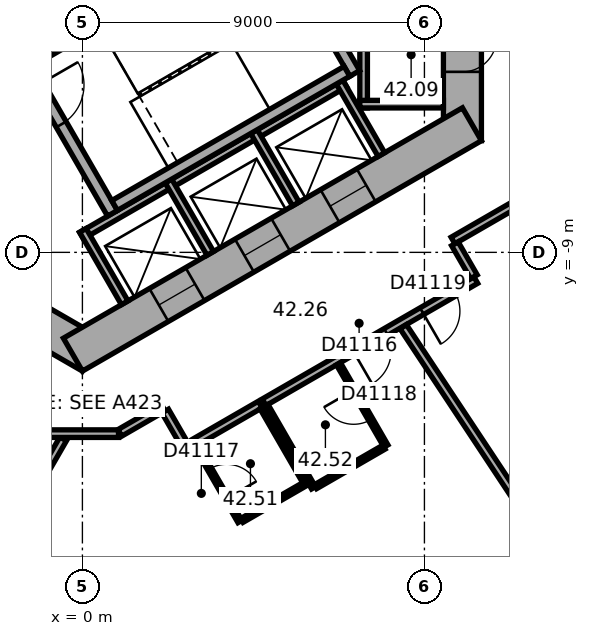
"""IFC4 building model, lengths in metres.
Left out: names, types, materials, properties, quantities, classifications, styles, units other than length and angle.
Written with IfcOpenShell. Run it as: python <this file> out.ifc"""

import sys

from ifc_helpers import new_model, si_unit, direction, frame, frame_2d, origin, place, context, subcontext, project, spatial, rectangle, extrude, element, fill, save


model = new_model("IFC4")
c1 = context("Model", 3, precision=1e-05, world=origin(), true_north=direction((0.0, 1.0)))
c2 = subcontext(c1, "Body", "Model", "MODEL_VIEW")
j1 = project(units=[si_unit("LENGTHUNIT", "METRE"), si_unit("PLANEANGLEUNIT", "RADIAN")], contexts=[c1])
p1 = place(None, origin())
s1 = spatial("IfcSite", under=j1, at=p1, CompositionType="ELEMENT")
p2 = place(p1, origin())
s2 = spatial("IfcBuilding", under=s1, at=p2, CompositionType="ELEMENT")
p3 = place(p2, frame((0.0, 0.0, 172.5)))
s3 = spatial("IfcBuildingStorey", under=s2, at=p3, CompositionType="ELEMENT", Elevation=172.5)
p4 = place(p3, frame((10.0, -6.062, 0.0), z_axis=(0.0, 0.0, 1.0), x_axis=(0.0, 1.0, 0.0)))
e1 = element("IfcWall", 1, at=p4, inside=s3, PredefinedType="SHEAR", context=c2, shape_type="SweptSolid", body=[
    extrude(rectangle(XDim=12.125, YDim=1.0, at=frame_2d((6.062, 0.0))), origin(), (0.0, 0.0, 1.0), 3.7),
])
p5 = place(p4, frame((6.262, 0.0, 0.0)))
e2 = element("IfcOpeningElement", 2, at=p5, cuts=e1, PredefinedType="OPENING", context=c2, shape_type="SweptSolid", body=[
    extrude(rectangle(XDim=1.5, YDim=2.1, at=frame_2d((0.75, 1.05))), frame((0.0, 0.51, 0.0), z_axis=(0.0, -1.0, 0.0), x_axis=(1.0, 0.0, 0.0)), (0.0, 0.0, 1.0), 1.02),
])
p6 = place(p4, frame((1.812, 0.0, 0.0)))
e3 = element("IfcOpeningElement", 3, at=p6, cuts=e1, PredefinedType="OPENING", context=c2, shape_type="SweptSolid", body=[
    extrude(rectangle(XDim=0.9, YDim=2.1, at=frame_2d((0.45, 1.05))), frame((0.0, 0.51, 0.0), z_axis=(0.0, -1.0, 0.0), x_axis=(1.0, 0.0, 0.0)), (0.0, 0.0, 1.0), 1.02),
])
p7 = place(p4, frame((4.412, 0.0, 0.0)))
e4 = element("IfcOpeningElement", 4, at=p7, cuts=e1, PredefinedType="OPENING", context=c2, shape_type="SweptSolid", body=[
    extrude(rectangle(XDim=0.9, YDim=2.1, at=frame_2d((0.45, 1.05))), frame((0.0, 0.51, 0.0), z_axis=(0.0, -1.0, 0.0), x_axis=(1.0, 0.0, 0.0)), (0.0, 0.0, 1.0), 1.02),
])
p8 = place(p3, frame((-10.25, -5.629, 0.0), z_axis=(0.0, 0.0, 1.0), x_axis=(0.866022616891, -0.50000482701, 0.0)))
e5 = element("IfcWall", 5, at=p8, inside=s3, PredefinedType="SHEAR", context=c2, shape_type="SweptSolid", body=[
    extrude(rectangle(XDim=12.125, YDim=1.0, at=frame_2d((6.062, 0.0))), origin(), (0.0, 0.0, 1.0), 3.7),
])
p9 = place(p8, frame((6.262, 0.0, 0.0)))
e6 = element("IfcOpeningElement", 6, at=p9, cuts=e5, PredefinedType="OPENING", context=c2, shape_type="SweptSolid", body=[
    extrude(rectangle(XDim=1.5, YDim=2.1, at=frame_2d((0.75, 1.05))), frame((0.0, 0.51, 0.0), z_axis=(0.0, -1.0, 0.0), x_axis=(1.0, 0.0, 0.0)), (0.0, 0.0, 1.0), 1.02),
])
p10 = place(p8, frame((1.712, 0.0, 0.0)))
e7 = element("IfcOpeningElement", 7, at=p10, cuts=e5, PredefinedType="OPENING", context=c2, shape_type="SweptSolid", body=[
    extrude(rectangle(XDim=1.1, YDim=2.1, at=frame_2d((0.55, 1.05))), frame((0.0, 0.51, 0.0), z_axis=(0.0, -1.0, 0.0), x_axis=(1.0, 0.0, 0.0)), (0.0, 0.0, 1.0), 1.02),
])
p11 = place(p8, frame((4.312, 0.0, 0.0)))
e8 = element("IfcOpeningElement", 8, at=p11, cuts=e5, PredefinedType="OPENING", context=c2, shape_type="SweptSolid", body=[
    extrude(rectangle(XDim=1.1, YDim=2.1, at=frame_2d((0.55, 1.05))), frame((0.0, 0.51, 0.0), z_axis=(0.0, -1.0, 0.0), x_axis=(1.0, 0.0, 0.0)), (0.0, 0.0, 1.0), 1.02),
])
p12 = place(p3, frame((-0.25, -11.691, 0.0), z_axis=(0.0, 0.0, 1.0), x_axis=(0.866022616891, 0.50000482701, 0.0)))
e9 = element("IfcWall", 9, at=p12, inside=s3, PredefinedType="SHEAR", context=c2, shape_type="SweptSolid", body=[
    extrude(rectangle(XDim=12.125, YDim=1.0, at=frame_2d((6.062, 0.0))), origin(), (0.0, 0.0, 1.0), 3.7),
])
p13 = place(p12, frame((2.612, 0.0, 0.0)))
e10 = element("IfcOpeningElement", 10, at=p13, cuts=e9, PredefinedType="OPENING", context=c2, shape_type="SweptSolid", body=[
    extrude(rectangle(XDim=1.1, YDim=2.1, at=frame_2d((0.55, 1.05))), frame((0.0, 0.51, 0.0), z_axis=(0.0, -1.0, 0.0), x_axis=(1.0, 0.0, 0.0)), (0.0, 0.0, 1.0), 1.02),
])
p14 = place(p12, frame((5.212, 0.0, 0.0)))
e11 = element("IfcOpeningElement", 11, at=p14, cuts=e9, PredefinedType="OPENING", context=c2, shape_type="SweptSolid", body=[
    extrude(rectangle(XDim=1.1, YDim=2.1, at=frame_2d((0.55, 1.05))), frame((0.0, 0.51, 0.0), z_axis=(0.0, -1.0, 0.0), x_axis=(1.0, 0.0, 0.0)), (0.0, 0.0, 1.0), 1.02),
])
p15 = place(p12, frame((7.812, 0.0, 0.0)))
e12 = element("IfcOpeningElement", 12, at=p15, cuts=e9, PredefinedType="OPENING", context=c2, shape_type="SweptSolid", body=[
    extrude(rectangle(XDim=1.1, YDim=2.1, at=frame_2d((0.55, 1.05))), frame((0.0, 0.51, 0.0), z_axis=(0.0, -1.0, 0.0), x_axis=(1.0, 0.0, 0.0)), (0.0, 0.0, 1.0), 1.02),
])
p16 = place(p3, frame((2.911, -24.156, 0.0), z_axis=(0.0, 0.0, 1.0), x_axis=(0.833882163564, 0.551942512668, 0.0)))
e13 = element("IfcWall", 13, at=p16, inside=s3, PredefinedType="STANDARD", context=c2, shape_type="SweptSolid", body=[
    extrude(rectangle(XDim=20.044, YDim=0.2, at=frame_2d((10.022, 0.0))), origin(), (0.0, 0.0, 1.0), 3.7),
])
p17 = place(p16, frame((1.313, 0.0, 0.9)))
e14 = element("IfcOpeningElement", 14, at=p17, cuts=e13, PredefinedType="OPENING", context=c2, shape_type="SweptSolid", body=[
    extrude(rectangle(XDim=2.4, YDim=2.0, at=frame_2d((1.2, 1.0))), frame((0.0, 0.11, 0.0), z_axis=(0.0, -1.0, 0.0), x_axis=(1.0, 0.0, 0.0)), (0.0, 0.0, 1.0), 0.22),
])
p18 = place(p16, frame((5.067, 0.0, 0.9)))
e15 = element("IfcOpeningElement", 15, at=p18, cuts=e13, PredefinedType="OPENING", context=c2, shape_type="SweptSolid", body=[
    extrude(rectangle(XDim=2.4, YDim=2.0, at=frame_2d((1.2, 1.0))), frame((0.0, 0.11, 0.0), z_axis=(0.0, -1.0, 0.0), x_axis=(1.0, 0.0, 0.0)), (0.0, 0.0, 1.0), 0.22),
])
p19 = place(p16, frame((8.821, 0.0, 0.9)))
e16 = element("IfcOpeningElement", 16, at=p19, cuts=e13, PredefinedType="OPENING", context=c2, shape_type="SweptSolid", body=[
    extrude(rectangle(XDim=2.4, YDim=2.0, at=frame_2d((1.2, 1.0))), frame((0.0, 0.11, 0.0), z_axis=(0.0, -1.0, 0.0), x_axis=(1.0, 0.0, 0.0)), (0.0, 0.0, 1.0), 0.22),
])
p20 = place(p16, frame((12.575, 0.0, 0.9)))
e17 = element("IfcOpeningElement", 17, at=p20, cuts=e13, PredefinedType="OPENING", context=c2, shape_type="SweptSolid", body=[
    extrude(rectangle(XDim=2.4, YDim=2.0, at=frame_2d((1.2, 1.0))), frame((0.0, 0.11, 0.0), z_axis=(0.0, -1.0, 0.0), x_axis=(1.0, 0.0, 0.0)), (0.0, 0.0, 1.0), 0.22),
])
p21 = place(p16, frame((16.329, 0.0, 0.9)))
e18 = element("IfcOpeningElement", 18, at=p21, cuts=e13, PredefinedType="OPENING", context=c2, shape_type="SweptSolid", body=[
    extrude(rectangle(XDim=2.4, YDim=2.0, at=frame_2d((1.2, 1.0))), frame((0.0, 0.11, 0.0), z_axis=(0.0, -1.0, 0.0), x_axis=(1.0, 0.0, 0.0)), (0.0, 0.0, 1.0), 0.22),
])
p22 = place(p3, frame((7.4, -5.2, 0.0), z_axis=(0.0, 0.0, 1.0), x_axis=(0.0, 1.0, 0.0)))
e19 = element("IfcWall", 19, at=p22, inside=s3, PredefinedType="PARTITIONING", context=c2, shape_type="SweptSolid", body=[
    extrude(rectangle(XDim=5.4, YDim=0.2, at=frame_2d((2.7, 0.0))), origin(), (0.0, 0.0, 1.0), 3.42),
])
p23 = place(p3, frame((7.3, -5.1, 0.0), z_axis=(0.0, 0.0, 1.0), x_axis=(1.0, 0.0, 0.0)))
e20 = element("IfcWall", 20, at=p23, inside=s3, PredefinedType="PARTITIONING", context=c2, shape_type="SweptSolid", body=[
    extrude(rectangle(XDim=2.2, YDim=0.2, at=frame_2d((1.1, 0.0))), origin(), (0.0, 0.0, 1.0), 3.42),
])
p24 = place(p3, frame((-0.024, -8.559, 0.0), z_axis=(0.0, 0.0, 1.0), x_axis=(0.866026010844, 0.49999894854, 0.0)))
e21 = element("IfcWall", 21, at=p24, inside=s3, PredefinedType="PARTITIONING", context=c2, shape_type="SweptSolid", body=[
    extrude(rectangle(XDim=8.0, YDim=0.2, at=frame_2d((4.0, 0.0))), origin(), (0.0, 0.0, 1.0), 3.42),
])
for number, where, z_axis, x_axis in (
    (22, (0.013, -8.422, 0.0), (0.0, 0.0, 1.0), (0.5, -0.866, 0.0)),
    (23, (2.264, -7.122, 0.0), (0.0, 0.0, 1.0), (0.5, -0.866, 0.0)),
    (24, (4.516, -5.822, 0.0), (0.0, 0.0, 1.0), (0.5, -0.866, 0.0)),
    (25, (6.768, -4.522, 0.0), (0.0, 0.0, 1.0), (0.5, -0.866, 0.0)),
):
    element("IfcWall", number, at=place(p3, frame(where, z_axis=z_axis, x_axis=x_axis)), inside=s3, PredefinedType="PARTITIONING", context=c2, shape_type="SweptSolid", body=[
        extrude(rectangle(XDim=2.2, YDim=0.2, at=frame_2d((1.1, 0.0))), origin(), (0.0, 0.0, 1.0), 3.42),
    ])
p25 = place(p3, frame((-1.558, -3.902, 0.0), z_axis=(0.0, 0.0, 1.0), x_axis=(0.499977259774, -0.866038532462, 0.0)))
e26 = element("IfcWall", 26, at=p25, inside=s3, PredefinedType="SHEAR", context=c2, shape_type="SweptSolid", body=[
    extrude(rectangle(XDim=4.7, YDim=0.3, at=frame_2d((2.35, 0.0))), origin(), (0.0, 0.0, 1.0), 3.42),
])
p26 = place(p25, frame((0.8, 0.0, 0.0)))
e27 = element("IfcOpeningElement", 27, at=p26, cuts=e26, PredefinedType="OPENING", context=c2, shape_type="SweptSolid", body=[
    extrude(rectangle(XDim=1.2, YDim=2.1, at=frame_2d((0.6, 1.05))), frame((0.0, 0.16, 0.0), z_axis=(0.0, -1.0, 0.0), x_axis=(1.0, 0.0, 0.0)), (0.0, 0.0, 1.0), 0.32),
])
p27 = place(p3, frame((4.816, -0.222, 0.0), z_axis=(0.0, 0.0, 1.0), x_axis=(0.499977259774, -0.866038532462, 0.0)))
e28 = element("IfcWall", 28, at=p27, inside=s3, PredefinedType="SHEAR", context=c2, shape_type="SweptSolid", body=[
    extrude(rectangle(XDim=4.7, YDim=0.3, at=frame_2d((2.35, 0.0))), origin(), (0.0, 0.0, 1.0), 3.42),
])
for number, where, z_axis, x_axis in (
    (29, (-1.353, -3.957, 0.0), (0.0, 0.0, 1.0), (0.866, 0.5, 0.0)),
    (30, (0.847, -7.767, 0.0), (0.0, 0.0, 1.0), (0.866, 0.5, 0.0)),
):
    element("IfcWall", number, at=place(p3, frame(where, z_axis=z_axis, x_axis=x_axis)), inside=s3, PredefinedType="SHEAR", context=c2, shape_type="SweptSolid", body=[
        extrude(rectangle(XDim=7.06, YDim=0.3, at=frame_2d((3.53, 0.0))), origin(), (0.0, 0.0, 1.0), 3.42),
    ])
p28 = place(p3, frame((-4.732, -21.228, 0.0), z_axis=(0.0, 0.0, 1.0), x_axis=(0.500000843414, 0.866024916838, 0.0)))
e31 = element("IfcWall", 31, at=p28, inside=s3, PredefinedType="PARTITIONING", context=c2, shape_type="SweptSolid", body=[
    extrude(rectangle(XDim=8.452, YDim=0.2, at=frame_2d((4.226, 0.0))), origin(), (0.0, 0.0, 1.0), 3.42),
])
p29 = place(p3, frame((-0.91, -13.77, 0.0), z_axis=(0.0, 0.0, 1.0), x_axis=(1.0, 0.0, 0.0)))
e32 = element("IfcWall", 32, at=p29, inside=s3, PredefinedType="PARTITIONING", context=c2, shape_type="SweptSolid", body=[
    extrude(rectangle(XDim=1.86, YDim=0.2, at=frame_2d((0.93, 0.0))), origin(), (0.0, 0.0, 1.0), 3.42),
])
p30 = place(p3, frame((0.985, -13.75, 0.0), z_axis=(0.0, 0.0, 1.0), x_axis=(0.866028661061, 0.499994358189, 0.0)))
e33 = element("IfcWall", 33, at=p30, inside=s3, PredefinedType="PARTITIONING", context=c2, shape_type="SweptSolid", body=[
    extrude(rectangle(XDim=1.321, YDim=0.2, at=frame_2d((0.661, 0.0))), origin(), (0.0, 0.0, 1.0), 3.42),
])
p31 = place(p3, frame((2.179, -13.176, 0.0), z_axis=(0.0, 0.0, 1.0), x_axis=(0.499978356969, -0.866037899034, 0.0)))
e34 = element("IfcWall", 34, at=p31, inside=s3, PredefinedType="PARTITIONING", context=c2, shape_type="SweptSolid", body=[
    extrude(rectangle(XDim=1.101, YDim=0.2, at=frame_2d((0.551, 0.0))), origin(), (0.0, 0.0, 1.0), 3.42),
])
p32 = place(p3, frame((2.946, -14.004, 0.0), z_axis=(0.0, 0.0, 1.0), x_axis=(0.866041268327, 0.499972520799, 0.0)))
e35 = element("IfcWall", 35, at=p32, inside=s3, PredefinedType="PARTITIONING", context=c2, shape_type="SweptSolid", body=[
    extrude(rectangle(XDim=2.0, YDim=0.2, at=frame_2d((1.0, 0.0))), origin(), (0.0, 0.0, 1.0), 3.42),
])
p33 = place(p3, frame((4.146, -16.083, 0.0), z_axis=(0.0, 0.0, 1.0), x_axis=(-0.499952165731, 0.866053019151, 0.0)))
e36 = element("IfcWall", 36, at=p33, inside=s3, PredefinedType="PARTITIONING", context=c2, shape_type="SweptSolid", body=[
    extrude(rectangle(XDim=2.3, YDim=0.12, at=frame_2d((1.15, 0.0))), origin(), (0.0, 0.0, 1.0), 3.42),
])
p34 = place(p33, frame((0.7, 0.0, 0.0)))
e37 = element("IfcOpeningElement", 37, at=p34, cuts=e36, PredefinedType="OPENING", context=c2, shape_type="SweptSolid", body=[
    extrude(rectangle(XDim=0.9, YDim=2.1, at=frame_2d((0.45, 1.05))), frame((0.0, 0.07, 0.0), z_axis=(0.0, -1.0, 0.0), x_axis=(1.0, 0.0, 0.0)), (0.0, 0.0, 1.0), 0.14),
])
p35 = place(p3, frame((4.728, -13.091, 0.0), z_axis=(0.0, 0.0, 1.0), x_axis=(0.500031774688, -0.866007057882, 0.0)))
e38 = element("IfcWall", 38, at=p35, inside=s3, PredefinedType="PARTITIONING", context=c2, shape_type="SweptSolid", body=[
    extrude(rectangle(XDim=2.3, YDim=0.12, at=frame_2d((1.15, 0.0))), origin(), (0.0, 0.0, 1.0), 3.42),
])
p36 = place(p3, frame((4.782, -12.944, 0.0), z_axis=(0.0, 0.0, 1.0), x_axis=(0.866022506829, 0.50000501764, 0.0)))
e39 = element("IfcWall", 39, at=p36, inside=s3, PredefinedType="PARTITIONING", context=c2, shape_type="SweptSolid", body=[
    extrude(rectangle(XDim=6.432, YDim=0.2, at=frame_2d((3.216, 0.0))), origin(), (0.0, 0.0, 1.0), 3.42),
])
p37 = place(p36, frame((2.704, 0.0, 0.0)))
e40 = element("IfcOpeningElement", 40, at=p37, cuts=e39, PredefinedType="OPENING", context=c2, shape_type="SweptSolid", body=[
    extrude(rectangle(XDim=1.0, YDim=2.1, at=frame_2d((0.5, 1.05))), frame((0.0, 0.11, 0.0), z_axis=(0.0, -1.0, 0.0), x_axis=(1.0, 0.0, 0.0)), (0.0, 0.0, 1.0), 0.22),
])
p38 = place(p36, frame((4.795, 0.0, 0.0)))
e41 = element("IfcOpeningElement", 41, at=p38, cuts=e39, PredefinedType="OPENING", context=c2, shape_type="SweptSolid", body=[
    extrude(rectangle(XDim=1.0, YDim=2.1, at=frame_2d((0.5, 1.05))), frame((0.0, 0.11, 0.0), z_axis=(0.0, -1.0, 0.0), x_axis=(1.0, 0.0, 0.0)), (0.0, 0.0, 1.0), 0.22),
])
p39 = place(p3, frame((5.826, -15.113, 0.0), z_axis=(0.0, 0.0, 1.0), x_axis=(-0.866045024864, -0.499966013754, 0.0)))
e42 = element("IfcWall", 42, at=p39, inside=s3, PredefinedType="PARTITIONING", context=c2, shape_type="SweptSolid", body=[
    extrude(rectangle(XDim=1.88, YDim=0.12, at=frame_2d((0.94, 0.0))), origin(), (0.0, 0.0, 1.0), 3.42),
])
p40 = place(p3, frame((6.082, -15.196, 0.0), z_axis=(0.0, 0.0, 1.0), x_axis=(-0.500004234368, 0.866022959057, 0.0)))
e43 = element("IfcWall", 43, at=p40, inside=s3, PredefinedType="PARTITIONING", context=c2, shape_type="SweptSolid", body=[
    extrude(rectangle(XDim=2.5, YDim=0.12, at=frame_2d((1.25, 0.0))), origin(), (0.0, 0.0, 1.0), 3.42),
])
p41 = place(p3, frame((6.737, -11.931, 0.0), z_axis=(0.0, 0.0, 1.0), x_axis=(0.500004234368, -0.866022959057, 0.0)))
e44 = element("IfcWall", 44, at=p41, inside=s3, PredefinedType="PARTITIONING", context=c2, shape_type="SweptSolid", body=[
    extrude(rectangle(XDim=2.5, YDim=0.12, at=frame_2d((1.25, 0.0))), origin(), (0.0, 0.0, 1.0), 3.42),
])
p42 = place(p41, frame((0.8, 0.0, 0.0)))
e45 = element("IfcOpeningElement", 45, at=p42, cuts=e44, PredefinedType="OPENING", context=c2, shape_type="SweptSolid", body=[
    extrude(rectangle(XDim=0.9, YDim=2.1, at=frame_2d((0.45, 1.05))), frame((0.0, 0.07, 0.0), z_axis=(0.0, -1.0, 0.0), x_axis=(1.0, 0.0, 0.0)), (0.0, 0.0, 1.0), 0.14),
])
p43 = place(p3, frame((7.935, -14.126, 0.0), z_axis=(0.0, 0.0, 1.0), x_axis=(-0.866009661879, -0.500027264788, 0.0)))
e46 = element("IfcWall", 46, at=p43, inside=s3, PredefinedType="PARTITIONING", context=c2, shape_type="SweptSolid", body=[
    extrude(rectangle(XDim=2.08, YDim=0.12, at=frame_2d((1.04, 0.0))), origin(), (0.0, 0.0, 1.0), 3.42),
])
p44 = place(p3, frame((9.752, -8.688, 0.0), z_axis=(0.0, 0.0, 1.0), x_axis=(0.865974105138, 0.500088841337, 0.0)))
e47 = element("IfcWall", 47, at=p44, inside=s3, PredefinedType="PARTITIONING", context=c2, shape_type="SweptSolid", body=[
    extrude(rectangle(XDim=1.961, YDim=0.2, at=frame_2d((0.98, 0.0))), origin(), (0.0, 0.0, 1.0), 3.42),
])
p45 = place(p3, frame((10.302, -9.642, 0.0), z_axis=(0.0, 0.0, 1.0), x_axis=(-0.500074377092, 0.865982457891, 0.0)))
e48 = element("IfcWall", 48, at=p45, inside=s3, PredefinedType="PARTITIONING", context=c2, shape_type="SweptSolid", body=[
    extrude(rectangle(XDim=1.001, YDim=0.2, at=frame_2d((0.5, 0.0))), origin(), (0.0, 0.0, 1.0), 3.42),
])
p46 = place(p3, frame((12.281, -16.755, 0.0), z_axis=(0.0, 0.0, 1.0), x_axis=(-0.551925794663, 0.833893228888, 0.0)))
e49 = element("IfcWall", 49, at=p46, inside=s3, PredefinedType="PARTITIONING", context=c2, shape_type="SweptSolid", body=[
    extrude(rectangle(XDim=6.953, YDim=0.2, at=frame_2d((3.476, 0.0))), origin(), (0.0, 0.0, 1.0), 3.42),
])
p47 = place(p26, origin())
e50 = element("IfcDoor", 50, at=p47, inside=s3, OperationType="SINGLE_SWING_RIGHT", PredefinedType="DOOR", context=c2, shape_type="SweptSolid", body=[
    extrude(rectangle(XDim=1.2, YDim=2.1, at=frame_2d((0.6, 1.05))), frame((0.0, 0.025, 0.0), z_axis=(0.0, -1.0, 0.0), x_axis=(1.0, 0.0, 0.0)), (0.0, 0.0, 1.0), 0.05),
])
fill(e27, e50)
p48 = place(p6, origin())
e51 = element("IfcDoor", 51, at=p48, inside=s3, OperationType="SINGLE_SWING_LEFT", PredefinedType="DOOR", context=c2, shape_type="SweptSolid", body=[
    extrude(rectangle(XDim=0.9, YDim=2.1, at=frame_2d((0.45, 1.05))), frame((0.0, 0.025, 0.0), z_axis=(0.0, -1.0, 0.0), x_axis=(1.0, 0.0, 0.0)), (0.0, 0.0, 1.0), 0.05),
])
fill(e3, e51)
p49 = place(p13, origin())
e52 = element("IfcDoor", 52, at=p49, inside=s3, OperationType="DOUBLE_DOOR_SLIDING", PredefinedType="DOOR", context=c2, shape_type="SweptSolid", body=[
    extrude(rectangle(XDim=1.1, YDim=2.1, at=frame_2d((0.55, 1.05))), frame((0.0, 0.025, 0.0), z_axis=(0.0, -1.0, 0.0), x_axis=(1.0, 0.0, 0.0)), (0.0, 0.0, 1.0), 0.05),
])
fill(e10, e52)
p50 = place(p14, origin())
e53 = element("IfcDoor", 53, at=p50, inside=s3, OperationType="DOUBLE_DOOR_SLIDING", PredefinedType="DOOR", context=c2, shape_type="SweptSolid", body=[
    extrude(rectangle(XDim=1.1, YDim=2.1, at=frame_2d((0.55, 1.05))), frame((0.0, 0.025, 0.0), z_axis=(0.0, -1.0, 0.0), x_axis=(1.0, 0.0, 0.0)), (0.0, 0.0, 1.0), 0.05),
])
fill(e11, e53)
p51 = place(p15, origin())
e54 = element("IfcDoor", 54, at=p51, inside=s3, OperationType="DOUBLE_DOOR_SLIDING", PredefinedType="DOOR", context=c2, shape_type="SweptSolid", body=[
    extrude(rectangle(XDim=1.1, YDim=2.1, at=frame_2d((0.55, 1.05))), frame((0.0, 0.025, 0.0), z_axis=(0.0, -1.0, 0.0), x_axis=(1.0, 0.0, 0.0)), (0.0, 0.0, 1.0), 0.05),
])
fill(e12, e54)
p52 = place(p37, origin())
e55 = element("IfcDoor", 55, at=p52, inside=s3, OperationType="SINGLE_SWING_LEFT", PredefinedType="DOOR", context=c2, shape_type="SweptSolid", body=[
    extrude(rectangle(XDim=1.0, YDim=2.1, at=frame_2d((0.5, 1.05))), frame((0.0, 0.025, 0.0), z_axis=(0.0, -1.0, 0.0), x_axis=(1.0, 0.0, 0.0)), (0.0, 0.0, 1.0), 0.05),
])
fill(e40, e55)
p53 = place(p34, origin())
e56 = element("IfcDoor", 56, at=p53, inside=s3, OperationType="SINGLE_SWING_LEFT", PredefinedType="DOOR", context=c2, shape_type="SweptSolid", body=[
    extrude(rectangle(XDim=0.9, YDim=2.1, at=frame_2d((0.45, 1.05))), frame((0.0, 0.025, 0.0), z_axis=(0.0, -1.0, 0.0), x_axis=(1.0, 0.0, 0.0)), (0.0, 0.0, 1.0), 0.05),
])
fill(e37, e56)
p54 = place(p42, origin())
e57 = element("IfcDoor", 57, at=p54, inside=s3, OperationType="SINGLE_SWING_LEFT", PredefinedType="DOOR", context=c2, shape_type="SweptSolid", body=[
    extrude(rectangle(XDim=0.9, YDim=2.1, at=frame_2d((0.45, 1.05))), frame((0.0, 0.025, 0.0), z_axis=(0.0, -1.0, 0.0), x_axis=(1.0, 0.0, 0.0)), (0.0, 0.0, 1.0), 0.05),
])
fill(e45, e57)
p55 = place(p38, origin())
e58 = element("IfcDoor", 58, at=p55, inside=s3, OperationType="SINGLE_SWING_LEFT", PredefinedType="DOOR", context=c2, shape_type="SweptSolid", body=[
    extrude(rectangle(XDim=1.0, YDim=2.1, at=frame_2d((0.5, 1.05))), frame((0.0, 0.025, 0.0), z_axis=(0.0, -1.0, 0.0), x_axis=(1.0, 0.0, 0.0)), (0.0, 0.0, 1.0), 0.05),
])
fill(e41, e58)
save(model, sys.argv[1])
